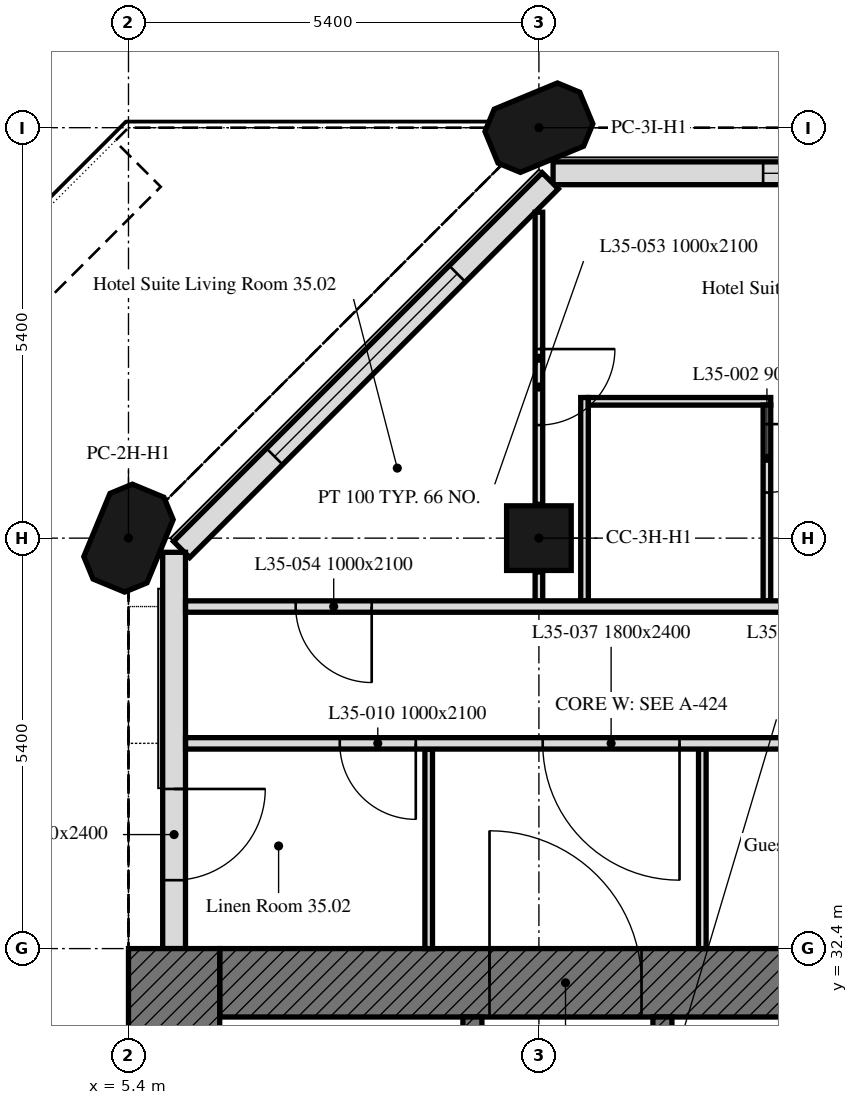
"""IFC4 building model, lengths in metres.
Left out: names, types, materials, properties, quantities, classifications, styles, units other than length and angle.
Written with IfcOpenShell. Run it as: python <this file> out.ifc"""

import sys

from ifc_helpers import new_model, si_unit, direction, frame, frame_2d, origin, origin_2d, place, context, subcontext, project, spatial, polyline, rectangle, outline, extrude, element, fill, save


model = new_model("IFC4")
c1 = context("Model", 3, precision=1e-05, world=origin(), true_north=direction((0.0, 1.0)))
c2 = subcontext(c1, "Body", "Model", "MODEL_VIEW")
j1 = project(units=[si_unit("LENGTHUNIT", "METRE"), si_unit("PLANEANGLEUNIT", "RADIAN")], contexts=[c1])
p1 = place(None, origin())
s1 = spatial("IfcSite", under=j1, at=p1, CompositionType="ELEMENT")
p2 = place(p1, origin())
s2 = spatial("IfcBuilding", under=s1, at=p2, CompositionType="ELEMENT")
p3 = place(p2, frame((0.0, 0.0, 152.8)))
s3 = spatial("IfcBuildingStorey", under=s2, at=p3, CompositionType="ELEMENT", Elevation=152.8)
p4 = place(p3, frame((5.4, 37.8, 0.0), z_axis=(0.0, 0.0, 1.0), x_axis=(0.382683432365, 0.923879532511, 0.0)))
e1 = element("IfcColumn", 1, at=p4, inside=s3, PredefinedType="COLUMN", context=c2, shape_type="SweptSolid", body=[
    extrude(outline(polyline([(-0.45, -0.45), (0.45, -0.45), (0.675, -0.225), (0.675, 0.225), (0.45, 0.45), (-0.45, 0.45), (-0.675, 0.225), (-0.675, -0.225), (-0.45, -0.45)])), origin(), (0.0, 0.0, 1.0), 3.0),
])
p5 = place(p3, frame((10.8, 37.8, 0.0), z_axis=(0.0, 0.0, 1.0), x_axis=(1.0, 0.0, 0.0)))
e2 = element("IfcColumn", 2, at=p5, inside=s3, PredefinedType="COLUMN", context=c2, shape_type="SweptSolid", body=[
    extrude(rectangle(XDim=0.85, YDim=0.85, at=origin_2d()), origin(), (0.0, 0.0, 1.0), 3.0),
])
p6 = place(p3, frame((10.8, 43.2, 0.0), z_axis=(0.0, 0.0, 1.0), x_axis=(0.923879532511, 0.382683432365, 0.0)))
e3 = element("IfcColumn", 3, at=p6, inside=s3, PredefinedType="COLUMN", context=c2, shape_type="SweptSolid", body=[
    extrude(outline(polyline([(-0.45, -0.45), (0.45, -0.45), (0.675, -0.225), (0.675, 0.225), (0.45, 0.45), (-0.45, 0.45), (-0.675, 0.225), (-0.675, -0.225), (-0.45, -0.45)])), origin(), (0.0, 0.0, 1.0), 3.0),
])
p7 = place(p3, frame((43.014, 42.6, 0.0), z_axis=(0.0, 0.0, 1.0), x_axis=(-1.0, 0.0, 0.0)))
e4 = element("IfcWall", 4, at=p7, inside=s3, PredefinedType="SOLIDWALL", context=c2, shape_type="SweptSolid", body=[
    extrude(rectangle(XDim=32.027, YDim=0.3, at=frame_2d((16.014, 0.0))), origin(), (0.0, 0.0, 1.0), 3.0),
])
p8 = place(p7, frame((0.814, 0.0, 0.9)))
e5 = element("IfcOpeningElement", 5, at=p8, cuts=e4, PredefinedType="OPENING", context=c2, shape_type="SweptSolid", body=[
    extrude(rectangle(XDim=3.4, YDim=1.7, at=frame_2d((1.7, 0.85))), frame((0.0, 0.16, 0.0), z_axis=(0.0, -1.0, 0.0), x_axis=(1.0, 0.0, 0.0)), (0.0, 0.0, 1.0), 0.32),
])
p9 = place(p7, frame((6.564, 0.0, 0.9)))
e6 = element("IfcOpeningElement", 6, at=p9, cuts=e4, PredefinedType="OPENING", context=c2, shape_type="SweptSolid", body=[
    extrude(rectangle(XDim=1.1, YDim=1.7, at=frame_2d((0.55, 0.85))), frame((0.0, 0.16, 0.0), z_axis=(0.0, -1.0, 0.0), x_axis=(1.0, 0.0, 0.0)), (0.0, 0.0, 1.0), 0.32),
])
p10 = place(p7, frame((11.614, 0.0, 0.9)))
e7 = element("IfcOpeningElement", 7, at=p10, cuts=e4, PredefinedType="OPENING", context=c2, shape_type="SweptSolid", body=[
    extrude(rectangle(XDim=3.4, YDim=1.7, at=frame_2d((1.7, 0.85))), frame((0.0, 0.16, 0.0), z_axis=(0.0, -1.0, 0.0), x_axis=(1.0, 0.0, 0.0)), (0.0, 0.0, 1.0), 0.32),
])
p11 = place(p7, frame((17.364, 0.0, 0.9)))
e8 = element("IfcOpeningElement", 8, at=p11, cuts=e4, PredefinedType="OPENING", context=c2, shape_type="SweptSolid", body=[
    extrude(rectangle(XDim=1.1, YDim=1.7, at=frame_2d((0.55, 0.85))), frame((0.0, 0.16, 0.0), z_axis=(0.0, -1.0, 0.0), x_axis=(1.0, 0.0, 0.0)), (0.0, 0.0, 1.0), 0.32),
])
p12 = place(p7, frame((22.414, 0.0, 0.9)))
e9 = element("IfcOpeningElement", 9, at=p12, cuts=e4, PredefinedType="OPENING", context=c2, shape_type="SweptSolid", body=[
    extrude(rectangle(XDim=3.4, YDim=1.7, at=frame_2d((1.7, 0.85))), frame((0.0, 0.16, 0.0), z_axis=(0.0, -1.0, 0.0), x_axis=(1.0, 0.0, 0.0)), (0.0, 0.0, 1.0), 0.32),
])
p13 = place(p7, frame((28.164, 0.0, 0.9)))
e10 = element("IfcOpeningElement", 10, at=p13, cuts=e4, PredefinedType="OPENING", context=c2, shape_type="SweptSolid", body=[
    extrude(rectangle(XDim=1.1, YDim=1.7, at=frame_2d((0.55, 0.85))), frame((0.0, 0.16, 0.0), z_axis=(0.0, -1.0, 0.0), x_axis=(1.0, 0.0, 0.0)), (0.0, 0.0, 1.0), 0.32),
])
p14 = place(p3, frame((10.949, 42.501, 0.0), z_axis=(0.0, 0.0, 1.0), x_axis=(-0.707106781187, -0.707106781187, 0.0)))
e11 = element("IfcWall", 11, at=p14, inside=s3, PredefinedType="SOLIDWALL", context=c2, shape_type="SweptSolid", body=[
    extrude(rectangle(XDim=6.86, YDim=0.3, at=frame_2d((3.43, 0.0))), origin(), (0.0, 0.0, 1.0), 3.0),
])
p15 = place(p14, frame((1.73, 0.0, 0.9)))
e12 = element("IfcOpeningElement", 12, at=p15, cuts=e11, PredefinedType="OPENING", context=c2, shape_type="SweptSolid", body=[
    extrude(rectangle(XDim=3.4, YDim=1.7, at=frame_2d((1.7, 0.85))), frame((0.0, 0.16, 0.0), z_axis=(0.0, -1.0, 0.0), x_axis=(1.0, 0.0, 0.0)), (0.0, 0.0, 1.0), 0.32),
])
p16 = place(p3, frame((6.0, 37.614, 0.0), z_axis=(0.0, 0.0, 1.0), x_axis=(0.0, -1.0, 0.0)))
e13 = element("IfcWall", 13, at=p16, inside=s3, PredefinedType="SOLIDWALL", context=c2, shape_type="SweptSolid", body=[
    extrude(rectangle(XDim=5.214, YDim=0.3, at=frame_2d((2.607, 0.0))), origin(), (0.0, 0.0, 1.0), 3.0),
])
p17 = place(p16, frame((3.114, 0.0, 0.0)))
e14 = element("IfcOpeningElement", 14, at=p17, cuts=e13, PredefinedType="OPENING", context=c2, shape_type="SweptSolid", body=[
    extrude(rectangle(XDim=1.2, YDim=2.4, at=frame_2d((0.6, 1.2))), frame((0.0, 0.16, 0.0), z_axis=(0.0, -1.0, 0.0), x_axis=(1.0, 0.0, 0.0)), (0.0, 0.0, 1.0), 0.32),
])
p18 = place(p3, frame((6.6, 31.95, 0.0), z_axis=(0.0, 0.0, 1.0), x_axis=(1.0, 0.0, 0.0)))
e15 = element("IfcWall", 15, at=p18, inside=s3, PredefinedType="SOLIDWALL", context=c2, shape_type="SweptSolid", body=[
    extrude(rectangle(XDim=11.1, YDim=0.9, at=frame_2d((5.55, 0.0))), origin(), (0.0, 0.0, 1.0), 3.0),
])
p19 = place(p18, frame((3.55, 0.0, 0.0)))
e16 = element("IfcOpeningElement", 16, at=p19, cuts=e15, PredefinedType="OPENING", context=c2, shape_type="SweptSolid", body=[
    extrude(rectangle(XDim=2.0, YDim=2.4, at=frame_2d((1.0, 1.2))), frame((0.0, 0.45, 0.0), z_axis=(0.0, -1.0, 0.0), x_axis=(1.0, 0.0, 0.0)), (0.0, 0.0, 1.0), 0.9),
])
p20 = place(p3, frame((6.0, 16.2, 0.0), z_axis=(0.0, 0.0, 1.0), x_axis=(0.0, 1.0, 0.0)))
e17 = element("IfcWall", 17, at=p20, inside=s3, PredefinedType="SOLIDWALL", context=c2, shape_type="SweptSolid", body=[
    extrude(rectangle(XDim=16.2, YDim=1.2, at=frame_2d((8.1, 0.0))), origin(), (0.0, 0.0, 1.0), 3.0),
])
p21 = place(p3, frame((9.925, 17.1, 0.0), z_axis=(0.0, 0.0, 1.0), x_axis=(0.0, 1.0, 0.0)))
e18 = element("IfcWall", 18, at=p21, inside=s3, PredefinedType="SOLIDWALL", context=c2, shape_type="SweptSolid", body=[
    extrude(rectangle(XDim=14.4, YDim=0.25, at=frame_2d((7.2, 0.0))), origin(), (0.0, 0.0, 1.0), 3.0),
])
p22 = place(p21, frame((4.6, 0.0, 0.0)))
e19 = element("IfcOpeningElement", 19, at=p22, cuts=e18, PredefinedType="OPENING", context=c2, shape_type="SweptSolid", body=[
    extrude(rectangle(XDim=1.0, YDim=2.1, at=frame_2d((0.5, 1.05))), frame((0.0, 0.125, 0.0), z_axis=(0.0, -1.0, 0.0), x_axis=(1.0, 0.0, 0.0)), (0.0, 0.0, 1.0), 0.25),
])
p23 = place(p21, frame((7.062, 0.0, 0.0)))
e20 = element("IfcOpeningElement", 20, at=p23, cuts=e18, PredefinedType="OPENING", context=c2, shape_type="SweptSolid", body=[
    extrude(rectangle(XDim=1.2, YDim=2.1, at=frame_2d((0.6, 1.05))), frame((0.0, 0.125, 0.0), z_axis=(0.0, -1.0, 0.0), x_axis=(1.0, 0.0, 0.0)), (0.0, 0.0, 1.0), 0.25),
])
p24 = place(p21, frame((9.472, 0.0, 0.0)))
e21 = element("IfcOpeningElement", 21, at=p24, cuts=e18, PredefinedType="OPENING", context=c2, shape_type="SweptSolid", body=[
    extrude(rectangle(XDim=0.9, YDim=2.1, at=frame_2d((0.45, 1.05))), frame((0.0, 0.125, 0.0), z_axis=(0.0, -1.0, 0.0), x_axis=(1.0, 0.0, 0.0)), (0.0, 0.0, 1.0), 0.25),
])
p25 = place(p21, frame((11.159, 0.0, 0.0)))
e22 = element("IfcOpeningElement", 22, at=p25, cuts=e18, PredefinedType="OPENING", context=c2, shape_type="SweptSolid", body=[
    extrude(rectangle(XDim=0.9, YDim=2.1, at=frame_2d((0.45, 1.05))), frame((0.0, 0.125, 0.0), z_axis=(0.0, -1.0, 0.0), x_axis=(1.0, 0.0, 0.0)), (0.0, 0.0, 1.0), 0.25),
])
p26 = place(p21, frame((13.1, 0.0, 0.0)))
e23 = element("IfcOpeningElement", 23, at=p26, cuts=e18, PredefinedType="OPENING", context=c2, shape_type="SweptSolid", body=[
    extrude(rectangle(XDim=0.9, YDim=2.1, at=frame_2d((0.45, 1.05))), frame((0.0, 0.125, 0.0), z_axis=(0.0, -1.0, 0.0), x_axis=(1.0, 0.0, 0.0)), (0.0, 0.0, 1.0), 0.25),
])
p27 = place(p3, frame((12.425, 29.4, 0.0), z_axis=(0.0, 0.0, 1.0), x_axis=(0.0, 1.0, 0.0)))
e24 = element("IfcWall", 24, at=p27, inside=s3, PredefinedType="SOLIDWALL", context=c2, shape_type="SweptSolid", body=[
    extrude(rectangle(XDim=2.1, YDim=0.25, at=frame_2d((1.05, 0.0))), origin(), (0.0, 0.0, 1.0), 3.0),
])
p28 = place(p27, frame((0.5, 0.0, 0.0)))
e25 = element("IfcOpeningElement", 25, at=p28, cuts=e24, PredefinedType="OPENING", context=c2, shape_type="SweptSolid", body=[
    extrude(rectangle(XDim=1.0, YDim=2.1, at=frame_2d((0.5, 1.05))), frame((0.0, 0.125, 0.0), z_axis=(0.0, -1.0, 0.0), x_axis=(1.0, 0.0, 0.0)), (0.0, 0.0, 1.0), 0.25),
])
p29 = place(p3, frame((10.8, 42.088, 0.0), z_axis=(0.0, 0.0, 1.0), x_axis=(0.0, -1.0, 0.0)))
e26 = element("IfcWall", 26, at=p29, inside=s3, PredefinedType="PARTITIONING", context=c2, shape_type="SweptSolid", body=[
    extrude(rectangle(XDim=3.843, YDim=0.1, at=frame_2d((1.921, 0.0))), origin(), (0.0, 0.0, 1.0), 3.0),
])
p30 = place(p29, frame((1.8, 0.0, 0.0)))
e27 = element("IfcOpeningElement", 27, at=p30, cuts=e26, PredefinedType="OPENING", context=c2, shape_type="SweptSolid", body=[
    extrude(rectangle(XDim=1.0, YDim=2.1, at=frame_2d((0.5, 1.05))), frame((0.0, 0.05, 0.0), z_axis=(0.0, -1.0, 0.0), x_axis=(1.0, 0.0, 0.0)), (0.0, 0.0, 1.0), 0.1),
])
p31 = place(p3, frame((10.8, 37.355, 0.0), z_axis=(0.0, 0.0, 1.0), x_axis=(0.0, -1.0, 0.0)))
e28 = element("IfcWall", 28, at=p31, inside=s3, PredefinedType="PARTITIONING", context=c2, shape_type="SweptSolid", body=[
    extrude(rectangle(XDim=0.38, YDim=0.1, at=frame_2d((0.19, 0.0))), origin(), (0.0, 0.0, 1.0), 3.0),
])
p32 = place(p3, frame((11.4, 36.975, 0.0), z_axis=(0.0, 0.0, 1.0), x_axis=(0.0, 1.0, 0.0)))
e29 = element("IfcWall", 29, at=p32, inside=s3, PredefinedType="PARTITIONING", context=c2, shape_type="SweptSolid", body=[
    extrude(rectangle(XDim=2.675, YDim=0.1, at=frame_2d((1.337, 0.0))), origin(), (0.0, 0.0, 1.0), 3.0),
])
p33 = place(p3, frame((11.45, 39.6, 0.0), z_axis=(0.0, 0.0, 1.0), x_axis=(1.0, 0.0, 0.0)))
e30 = element("IfcWall", 30, at=p33, inside=s3, PredefinedType="PARTITIONING", context=c2, shape_type="SweptSolid", body=[
    extrude(rectangle(XDim=2.4, YDim=0.1, at=frame_2d((1.2, 0.0))), origin(), (0.0, 0.0, 1.0), 3.0),
])
p34 = place(p3, frame((13.8, 39.55, 0.0), z_axis=(0.0, 0.0, 1.0), x_axis=(0.0, -1.0, 0.0)))
e31 = element("IfcWall", 31, at=p34, inside=s3, PredefinedType="PARTITIONING", context=c2, shape_type="SweptSolid", body=[
    extrude(rectangle(XDim=2.575, YDim=0.1, at=frame_2d((1.288, 0.0))), origin(), (0.0, 0.0, 1.0), 3.0),
])
p35 = place(p34, frame((0.25, 0.0, 0.0)))
e32 = element("IfcOpeningElement", 32, at=p35, cuts=e31, PredefinedType="OPENING", context=c2, shape_type="SweptSolid", body=[
    extrude(rectangle(XDim=0.9, YDim=2.1, at=frame_2d((0.45, 1.05))), frame((0.0, 0.05, 0.0), z_axis=(0.0, -1.0, 0.0), x_axis=(1.0, 0.0, 0.0)), (0.0, 0.0, 1.0), 0.1),
])
p36 = place(p3, frame((47.849, 36.9, 0.0), z_axis=(0.0, 0.0, 1.0), x_axis=(-1.0, 0.0, 0.0)))
e33 = element("IfcWall", 33, at=p36, inside=s3, PredefinedType="PARTITIONING", context=c2, shape_type="SweptSolid", body=[
    extrude(rectangle(XDim=41.698, YDim=0.15, at=frame_2d((20.849, 0.0))), origin(), (0.0, 0.0, 1.0), 3.0),
])
p37 = place(p36, frame((27.649, 0.0, 0.0)))
e34 = element("IfcOpeningElement", 34, at=p37, cuts=e33, PredefinedType="OPENING", context=c2, shape_type="SweptSolid", body=[
    extrude(rectangle(XDim=1.0, YDim=2.1, at=frame_2d((0.5, 1.05))), frame((0.0, 0.075, 0.0), z_axis=(0.0, -1.0, 0.0), x_axis=(1.0, 0.0, 0.0)), (0.0, 0.0, 1.0), 0.15),
])
p38 = place(p36, frame((22.249, 0.0, 0.0)))
e35 = element("IfcOpeningElement", 35, at=p38, cuts=e33, PredefinedType="OPENING", context=c2, shape_type="SweptSolid", body=[
    extrude(rectangle(XDim=1.0, YDim=2.1, at=frame_2d((0.5, 1.05))), frame((0.0, 0.075, 0.0), z_axis=(0.0, -1.0, 0.0), x_axis=(1.0, 0.0, 0.0)), (0.0, 0.0, 1.0), 0.15),
])
p39 = place(p36, frame((16.849, 0.0, 0.0)))
e36 = element("IfcOpeningElement", 36, at=p39, cuts=e33, PredefinedType="OPENING", context=c2, shape_type="SweptSolid", body=[
    extrude(rectangle(XDim=1.0, YDim=2.1, at=frame_2d((0.5, 1.05))), frame((0.0, 0.075, 0.0), z_axis=(0.0, -1.0, 0.0), x_axis=(1.0, 0.0, 0.0)), (0.0, 0.0, 1.0), 0.15),
])
p40 = place(p36, frame((11.449, 0.0, 0.0)))
e37 = element("IfcOpeningElement", 37, at=p40, cuts=e33, PredefinedType="OPENING", context=c2, shape_type="SweptSolid", body=[
    extrude(rectangle(XDim=1.0, YDim=2.1, at=frame_2d((0.5, 1.05))), frame((0.0, 0.075, 0.0), z_axis=(0.0, -1.0, 0.0), x_axis=(1.0, 0.0, 0.0)), (0.0, 0.0, 1.0), 0.15),
])
p41 = place(p36, frame((2.744, 0.0, 0.0)))
e38 = element("IfcOpeningElement", 38, at=p41, cuts=e33, PredefinedType="OPENING", context=c2, shape_type="SweptSolid", body=[
    extrude(rectangle(XDim=1.0, YDim=2.1, at=frame_2d((0.5, 1.05))), frame((0.0, 0.075, 0.0), z_axis=(0.0, -1.0, 0.0), x_axis=(1.0, 0.0, 0.0)), (0.0, 0.0, 1.0), 0.15),
])
p42 = place(p36, frame((39.249, 0.0, 0.0)))
e39 = element("IfcOpeningElement", 39, at=p42, cuts=e33, PredefinedType="OPENING", context=c2, shape_type="SweptSolid", body=[
    extrude(rectangle(XDim=1.0, YDim=2.1, at=frame_2d((0.5, 1.05))), frame((0.0, 0.075, 0.0), z_axis=(0.0, -1.0, 0.0), x_axis=(1.0, 0.0, 0.0)), (0.0, 0.0, 1.0), 0.15),
])
for number, where, z_axis, x_axis in (
    (40, (12.95, 32.4, 0.0), (0.0, 0.0, 1.0), (0.0, 1.0, 0.0)),
    (41, (9.35, 35.025, 0.0), (0.0, 0.0, 1.0), (0.0, -1.0, 0.0)),
):
    element("IfcWall", number, at=place(p3, frame(where, z_axis=z_axis, x_axis=x_axis)), inside=s3, PredefinedType="PARTITIONING", context=c2, shape_type="SweptSolid", body=[
        extrude(rectangle(XDim=2.625, YDim=0.1, at=frame_2d((1.312, 0.0))), origin(), (0.0, 0.0, 1.0), 3.0),
    ])
p43 = place(p3, frame((43.275, 35.1, 0.0), z_axis=(0.0, 0.0, 1.0), x_axis=(-1.0, 0.0, 0.0)))
e42 = element("IfcWall", 42, at=p43, inside=s3, PredefinedType="PARTITIONING", context=c2, shape_type="SweptSolid", body=[
    extrude(rectangle(XDim=37.124, YDim=0.15, at=frame_2d((18.562, 0.0))), origin(), (0.0, 0.0, 1.0), 3.0),
])
p44 = place(p43, frame((18.475, 0.0, 0.0)))
e43 = element("IfcOpeningElement", 43, at=p44, cuts=e42, PredefinedType="OPENING", context=c2, shape_type="SweptSolid", body=[
    extrude(rectangle(XDim=1.0, YDim=2.1, at=frame_2d((0.5, 1.05))), frame((0.0, 0.075, 0.0), z_axis=(0.0, -1.0, 0.0), x_axis=(1.0, 0.0, 0.0)), (0.0, 0.0, 1.0), 0.15),
])
p45 = place(p43, frame((34.095, 0.0, 0.0)))
e44 = element("IfcOpeningElement", 44, at=p45, cuts=e42, PredefinedType="OPENING", context=c2, shape_type="SweptSolid", body=[
    extrude(rectangle(XDim=1.0, YDim=2.1, at=frame_2d((0.5, 1.05))), frame((0.0, 0.075, 0.0), z_axis=(0.0, -1.0, 0.0), x_axis=(1.0, 0.0, 0.0)), (0.0, 0.0, 1.0), 0.15),
])
p46 = place(p43, frame((8.75, 0.0, 0.0)))
e45 = element("IfcOpeningElement", 45, at=p46, cuts=e42, PredefinedType="OPENING", context=c2, shape_type="SweptSolid", body=[
    extrude(rectangle(XDim=1.0, YDim=2.1, at=frame_2d((0.5, 1.05))), frame((0.0, 0.075, 0.0), z_axis=(0.0, -1.0, 0.0), x_axis=(1.0, 0.0, 0.0)), (0.0, 0.0, 1.0), 0.15),
])
p47 = place(p43, frame((1.55, 0.0, 0.0)))
e46 = element("IfcOpeningElement", 46, at=p47, cuts=e42, PredefinedType="OPENING", context=c2, shape_type="SweptSolid", body=[
    extrude(rectangle(XDim=1.0, YDim=2.1, at=frame_2d((0.5, 1.05))), frame((0.0, 0.075, 0.0), z_axis=(0.0, -1.0, 0.0), x_axis=(1.0, 0.0, 0.0)), (0.0, 0.0, 1.0), 0.15),
])
p48 = place(p43, frame((28.2, 0.0, 0.0)))
e47 = element("IfcOpeningElement", 47, at=p48, cuts=e42, PredefinedType="OPENING", context=c2, shape_type="SweptSolid", body=[
    extrude(rectangle(XDim=1.0, YDim=2.1, at=frame_2d((0.5, 1.05))), frame((0.0, 0.075, 0.0), z_axis=(0.0, -1.0, 0.0), x_axis=(1.0, 0.0, 0.0)), (0.0, 0.0, 1.0), 0.15),
])
p49 = place(p43, frame((30.625, 0.0, 0.0)))
e48 = element("IfcOpeningElement", 48, at=p49, cuts=e42, PredefinedType="OPENING", context=c2, shape_type="SweptSolid", body=[
    extrude(rectangle(XDim=1.8, YDim=2.4, at=frame_2d((0.9, 1.2))), frame((0.0, 0.075, 0.0), z_axis=(0.0, -1.0, 0.0), x_axis=(1.0, 0.0, 0.0)), (0.0, 0.0, 1.0), 0.15),
])
p50 = place(p43, frame((5.525, 0.0, 0.0)))
e49 = element("IfcOpeningElement", 49, at=p50, cuts=e42, PredefinedType="OPENING", context=c2, shape_type="SweptSolid", body=[
    extrude(rectangle(XDim=1.8, YDim=2.4, at=frame_2d((0.9, 1.2))), frame((0.0, 0.075, 0.0), z_axis=(0.0, -1.0, 0.0), x_axis=(1.0, 0.0, 0.0)), (0.0, 0.0, 1.0), 0.15),
])
p51 = place(p17, origin())
e50 = element("IfcDoor", 50, at=p51, inside=s3, OperationType="SINGLE_SWING_LEFT", PredefinedType="DOOR", context=c2, shape_type="SweptSolid", body=[
    extrude(rectangle(XDim=1.2, YDim=2.4, at=frame_2d((0.6, 1.2))), frame((0.0, 0.025, 0.0), z_axis=(0.0, -1.0, 0.0), x_axis=(1.0, 0.0, 0.0)), (0.0, 0.0, 1.0), 0.05),
])
fill(e14, e50)
p52 = place(p13, origin())
e51 = element("IfcWindow", 51, at=p52, inside=s3, PartitioningType="SINGLE_PANEL", PredefinedType="WINDOW", context=c2, shape_type="SweptSolid", body=[
    extrude(rectangle(XDim=1.1, YDim=1.7, at=frame_2d((0.55, 0.85))), frame((0.0, 0.03, 0.0), z_axis=(0.0, -1.0, 0.0), x_axis=(1.0, 0.0, 0.0)), (0.0, 0.0, 1.0), 0.06),
])
fill(e10, e51)
p53 = place(p15, origin())
e52 = element("IfcWindow", 52, at=p53, inside=s3, PartitioningType="SINGLE_PANEL", PredefinedType="WINDOW", context=c2, shape_type="SweptSolid", body=[
    extrude(rectangle(XDim=3.4, YDim=1.7, at=frame_2d((1.7, 0.85))), frame((0.0, 0.03, 0.0), z_axis=(0.0, -1.0, 0.0), x_axis=(1.0, 0.0, 0.0)), (0.0, 0.0, 1.0), 0.06),
])
fill(e12, e52)
p54 = place(p19, origin())
e53 = element("IfcDoor", 53, at=p54, inside=s3, OperationType="DOUBLE_DOOR_SINGLE_SWING", PredefinedType="DOOR", context=c2, shape_type="SweptSolid", body=[
    extrude(rectangle(XDim=2.0, YDim=2.4, at=frame_2d((1.0, 1.2))), frame((0.0, 0.025, 0.0), z_axis=(0.0, -1.0, 0.0), x_axis=(1.0, 0.0, 0.0)), (0.0, 0.0, 1.0), 0.05),
])
fill(e16, e53)
p55 = place(p35, origin())
e54 = element("IfcDoor", 54, at=p55, inside=s3, OperationType="SINGLE_SWING_LEFT", PredefinedType="DOOR", context=c2, shape_type="SweptSolid", body=[
    extrude(rectangle(XDim=0.9, YDim=2.1, at=frame_2d((0.45, 1.05))), frame((0.0, 0.025, 0.0), z_axis=(0.0, -1.0, 0.0), x_axis=(1.0, 0.0, 0.0)), (0.0, 0.0, 1.0), 0.05),
])
fill(e32, e54)
p56 = place(p45, origin())
e55 = element("IfcDoor", 55, at=p56, inside=s3, OperationType="SINGLE_SWING_LEFT", PredefinedType="DOOR", context=c2, shape_type="SweptSolid", body=[
    extrude(rectangle(XDim=1.0, YDim=2.1, at=frame_2d((0.5, 1.05))), frame((0.0, 0.025, 0.0), z_axis=(0.0, -1.0, 0.0), x_axis=(1.0, 0.0, 0.0)), (0.0, 0.0, 1.0), 0.05),
])
fill(e44, e55)
p57 = place(p49, origin())
e56 = element("IfcDoor", 56, at=p57, inside=s3, OperationType="DOUBLE_DOOR_SINGLE_SWING", PredefinedType="DOOR", context=c2, shape_type="SweptSolid", body=[
    extrude(rectangle(XDim=1.8, YDim=2.4, at=frame_2d((0.9, 1.2))), frame((0.0, 0.025, 0.0), z_axis=(0.0, -1.0, 0.0), x_axis=(1.0, 0.0, 0.0)), (0.0, 0.0, 1.0), 0.05),
])
fill(e48, e56)
p58 = place(p30, origin())
e57 = element("IfcDoor", 57, at=p58, inside=s3, OperationType="SINGLE_SWING_LEFT", PredefinedType="DOOR", context=c2, shape_type="SweptSolid", body=[
    extrude(rectangle(XDim=1.0, YDim=2.1, at=frame_2d((0.5, 1.05))), frame((0.0, 0.025, 0.0), z_axis=(0.0, -1.0, 0.0), x_axis=(1.0, 0.0, 0.0)), (0.0, 0.0, 1.0), 0.05),
])
fill(e27, e57)
p59 = place(p42, origin())
e58 = element("IfcDoor", 58, at=p59, inside=s3, OperationType="SINGLE_SWING_RIGHT", PredefinedType="DOOR", context=c2, shape_type="SweptSolid", body=[
    extrude(rectangle(XDim=1.0, YDim=2.1, at=frame_2d((0.5, 1.05))), frame((0.0, 0.025, 0.0), z_axis=(0.0, -1.0, 0.0), x_axis=(1.0, 0.0, 0.0)), (0.0, 0.0, 1.0), 0.05),
])
fill(e39, e58)
save(model, sys.argv[1])
